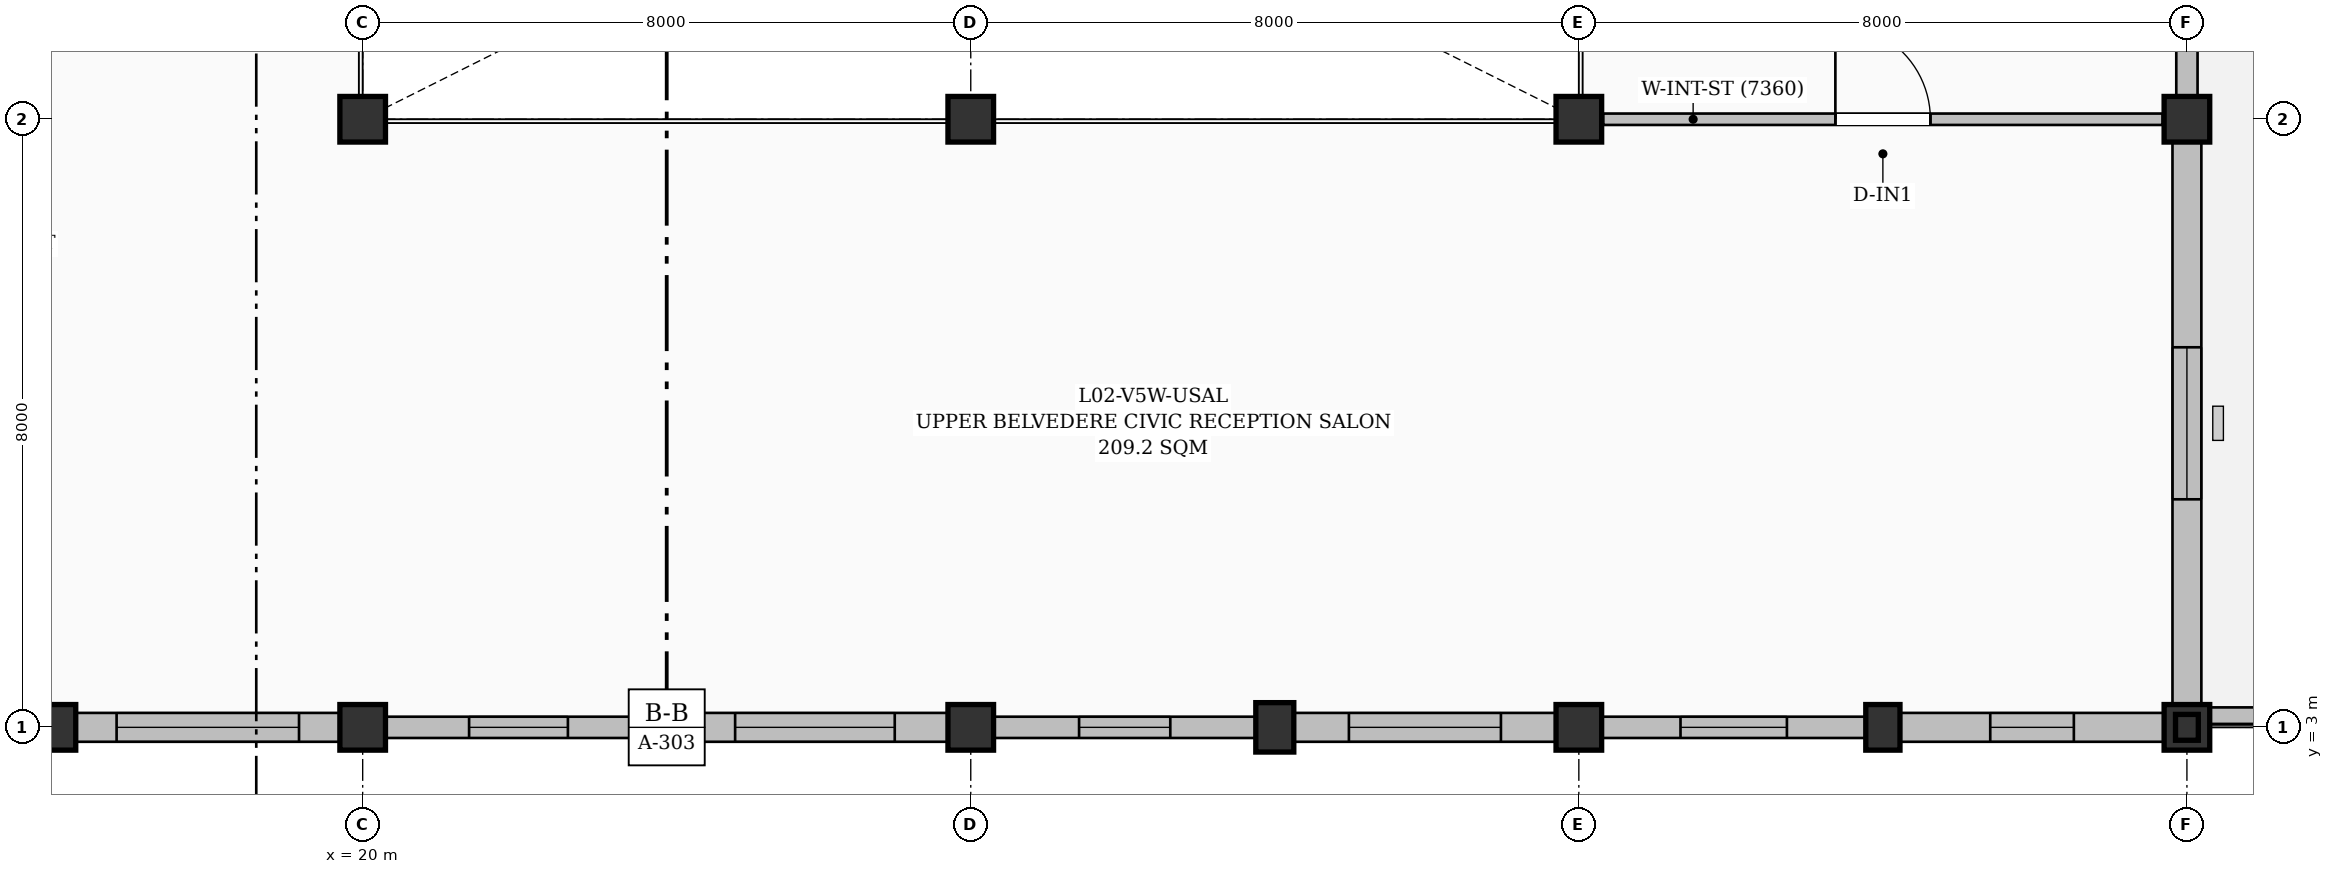
"""IFC4 building model, lengths in metres.
Left out: names, types, materials, properties, quantities, classifications, styles, units other than length and angle.
Written with IfcOpenShell. Run it as: python <this file> out.ifc"""

import sys

from ifc_helpers import new_model, si_unit, direction, frame, frame_2d, origin, origin_2d, place, context, subcontext, project, spatial, rectangle, i_section, extrude, element, fill, save


model = new_model("IFC4")
c1 = context("Model", 3, precision=1e-05, world=origin(), true_north=direction((0.0, 1.0)))
c2 = subcontext(c1, "Body", "Model", "MODEL_VIEW")
j1 = project(units=[si_unit("LENGTHUNIT", "METRE"), si_unit("PLANEANGLEUNIT", "RADIAN")], contexts=[c1])
p1 = place(None, origin())
s1 = spatial("IfcSite", under=j1, at=p1, CompositionType="ELEMENT")
p2 = place(p1, origin())
s2 = spatial("IfcBuilding", under=s1, at=p2, CompositionType="ELEMENT")
p3 = place(p2, frame((0.0, 0.0, 9.3)))
s3 = spatial("IfcBuildingStorey", under=s2, at=p3, CompositionType="ELEMENT", Elevation=9.3)
p4 = place(p3, frame((16.0, 3.0, 0.0), z_axis=(0.0, 0.0, 1.0), x_axis=(1.0, 0.0, 0.0)))
e1 = element("IfcColumn", 1, at=p4, inside=s3, PredefinedType="PILASTER", context=c2, shape_type="SweptSolid", body=[
    extrude(rectangle(XDim=0.45, YDim=0.6, at=origin_2d()), origin(), (0.0, 0.0, 1.0), 4.5),
])
for number, where, z_axis, x_axis in (
    (2, (20.0, 3.0, 0.0), (0.0, 0.0, 1.0), (1.0, 0.0, 0.0)),
    (3, (20.0, 11.0, 0.0), (0.0, 0.0, 1.0), (1.0, 0.0, 0.0)),
):
    element("IfcColumn", number, at=place(p3, frame(where, z_axis=z_axis, x_axis=x_axis)), inside=s3, PredefinedType="COLUMN", context=c2, shape_type="SweptSolid", body=[
        extrude(rectangle(XDim=0.6, YDim=0.6, at=origin_2d()), origin(), (0.0, 0.0, 1.0), 4.5),
    ])
p5 = place(p3, frame((24.0, 3.0, 0.0), z_axis=(0.0, 0.0, 1.0), x_axis=(1.0, 0.0, 0.0)))
e4 = element("IfcColumn", 4, at=p5, inside=s3, PredefinedType="PILASTER", context=c2, shape_type="SweptSolid", body=[
    extrude(rectangle(XDim=0.4, YDim=0.55, at=origin_2d()), origin(), (0.0, 0.0, 1.0), 4.5),
])
for number, where, z_axis, x_axis in (
    (5, (28.0, 3.0, 0.0), (0.0, 0.0, 1.0), (1.0, 0.0, 0.0)),
    (6, (28.0, 11.0, 0.0), (0.0, 0.0, 1.0), (1.0, 0.0, 0.0)),
):
    element("IfcColumn", number, at=place(p3, frame(where, z_axis=z_axis, x_axis=x_axis)), inside=s3, PredefinedType="COLUMN", context=c2, shape_type="SweptSolid", body=[
        extrude(rectangle(XDim=0.6, YDim=0.6, at=origin_2d()), origin(), (0.0, 0.0, 1.0), 4.5),
    ])
p6 = place(p3, frame((32.0, 3.0, 0.0), z_axis=(0.0, 0.0, 1.0), x_axis=(1.0, 0.0, 0.0)))
e7 = element("IfcColumn", 7, at=p6, inside=s3, PredefinedType="PILASTER", context=c2, shape_type="SweptSolid", body=[
    extrude(rectangle(XDim=0.5, YDim=0.65, at=origin_2d()), origin(), (0.0, 0.0, 1.0), 4.5),
])
for number, where, z_axis, x_axis in (
    (8, (36.0, 3.0, 0.0), (0.0, 0.0, 1.0), (1.0, 0.0, 0.0)),
    (9, (36.0, 11.0, 0.0), (0.0, 0.0, 1.0), (1.0, 0.0, 0.0)),
):
    element("IfcColumn", number, at=place(p3, frame(where, z_axis=z_axis, x_axis=x_axis)), inside=s3, PredefinedType="COLUMN", context=c2, shape_type="SweptSolid", body=[
        extrude(rectangle(XDim=0.6, YDim=0.6, at=origin_2d()), origin(), (0.0, 0.0, 1.0), 4.5),
    ])
p7 = place(p3, frame((40.0, 3.0, 0.0), z_axis=(0.0, 0.0, 1.0), x_axis=(1.0, 0.0, 0.0)))
e10 = element("IfcColumn", 10, at=p7, inside=s3, PredefinedType="PILASTER", context=c2, shape_type="SweptSolid", body=[
    extrude(rectangle(XDim=0.45, YDim=0.6, at=origin_2d()), origin(), (0.0, 0.0, 1.0), 4.5),
])
for number, where, z_axis, x_axis in (
    (11, (44.0, 3.0, 0.0), (0.0, 0.0, 1.0), (1.0, 0.0, 0.0)),
    (12, (44.0, 11.0, 0.0), (0.0, 0.0, 1.0), (1.0, 0.0, 0.0)),
):
    element("IfcColumn", number, at=place(p3, frame(where, z_axis=z_axis, x_axis=x_axis)), inside=s3, PredefinedType="COLUMN", context=c2, shape_type="SweptSolid", body=[
        extrude(rectangle(XDim=0.6, YDim=0.6, at=origin_2d()), origin(), (0.0, 0.0, 1.0), 4.5),
    ])
p8 = place(p3, frame((44.0, 3.0, 4.5), z_axis=(0.0, 0.0, 1.0), x_axis=(1.0, 0.0, 0.0)))
e13 = element("IfcColumn", 13, at=p8, inside=s3, PredefinedType="COLUMN", context=c2, shape_type="SweptSolid", body=[
    extrude(i_section(OverallWidth=0.3, OverallDepth=0.34, WebThickness=0.012, FlangeThickness=0.021, FilletRadius=0.027, at=origin_2d()), origin(), (0.0, 0.0, 1.0), 1.566),
])
p9 = place(p3, frame((44.0, 18.7, 0.0), z_axis=(0.0, 0.0, 1.0), x_axis=(0.0, -1.0, 0.0)))
e14 = element("IfcWall", 14, at=p9, inside=s3, PredefinedType="SOLIDWALL", context=c2, shape_type="SweptSolid", body=[
    extrude(rectangle(XDim=7.4, YDim=0.28, at=frame_2d((3.7, 0.0))), origin(), (0.0, 0.0, 1.0), 3.585),
])
p10 = place(p9, frame((3.0, 0.0, 0.95)))
e15 = element("IfcOpeningElement", 15, at=p10, cuts=e14, PredefinedType="OPENING", context=c2, shape_type="SweptSolid", body=[
    extrude(rectangle(XDim=1.4, YDim=1.8, at=frame_2d((0.7, 0.9))), frame((0.0, 0.15, 0.0), z_axis=(0.0, -1.0, 0.0), x_axis=(1.0, 0.0, 0.0)), (0.0, 0.0, 1.0), 0.3),
])
p11 = place(p3, frame((44.0, 10.7, 0.0), z_axis=(0.0, 0.0, 1.0), x_axis=(0.0, -1.0, 0.0)))
e16 = element("IfcWall", 16, at=p11, inside=s3, PredefinedType="SOLIDWALL", context=c2, shape_type="SweptSolid", body=[
    extrude(rectangle(XDim=7.4, YDim=0.38, at=frame_2d((3.7, 0.0))), origin(), (0.0, 0.0, 1.0), 3.585),
])
p12 = place(p11, frame((2.7, 0.0, 0.95)))
e17 = element("IfcOpeningElement", 17, at=p12, cuts=e16, PredefinedType="OPENING", context=c2, shape_type="SweptSolid", body=[
    extrude(rectangle(XDim=2.0, YDim=1.8, at=frame_2d((1.0, 0.9))), frame((0.0, 0.2, 0.0), z_axis=(0.0, -1.0, 0.0), x_axis=(1.0, 0.0, 0.0)), (0.0, 0.0, 1.0), 0.4),
])
p13 = place(p3, frame((43.7, 3.0, 0.0), z_axis=(0.0, 0.0, 1.0), x_axis=(-1.0, 0.0, 0.0)))
e18 = element("IfcWall", 18, at=p13, inside=s3, PredefinedType="SOLIDWALL", context=c2, shape_type="SweptSolid", body=[
    extrude(rectangle(XDim=3.475, YDim=0.38, at=frame_2d((1.737, 0.0))), origin(), (0.0, 0.0, 1.0), 4.125),
])
p14 = place(p13, frame((1.188, 0.0, 0.95)))
e19 = element("IfcOpeningElement", 19, at=p14, cuts=e18, PredefinedType="OPENING", context=c2, shape_type="SweptSolid", body=[
    extrude(rectangle(XDim=1.1, YDim=2.0, at=frame_2d((0.55, 1.0))), frame((0.0, 0.2, 0.0), z_axis=(0.0, -1.0, 0.0), x_axis=(1.0, 0.0, 0.0)), (0.0, 0.0, 1.0), 0.4),
])
p15 = place(p3, frame((39.775, 3.0, 0.0), z_axis=(0.0, 0.0, 1.0), x_axis=(-1.0, 0.0, 0.0)))
e20 = element("IfcWall", 20, at=p15, inside=s3, PredefinedType="SOLIDWALL", context=c2, shape_type="SweptSolid", body=[
    extrude(rectangle(XDim=3.475, YDim=0.28, at=frame_2d((1.737, 0.0))), origin(), (0.0, 0.0, 1.0), 4.125),
])
p16 = place(p15, frame((1.038, 0.0, 0.95)))
e21 = element("IfcOpeningElement", 21, at=p16, cuts=e20, PredefinedType="OPENING", context=c2, shape_type="SweptSolid", body=[
    extrude(rectangle(XDim=1.4, YDim=1.8, at=frame_2d((0.7, 0.9))), frame((0.0, 0.15, 0.0), z_axis=(0.0, -1.0, 0.0), x_axis=(1.0, 0.0, 0.0)), (0.0, 0.0, 1.0), 0.3),
])
p17 = place(p3, frame((35.7, 3.0, 0.0), z_axis=(0.0, 0.0, 1.0), x_axis=(-1.0, 0.0, 0.0)))
e22 = element("IfcWall", 22, at=p17, inside=s3, PredefinedType="SOLIDWALL", context=c2, shape_type="SweptSolid", body=[
    extrude(rectangle(XDim=3.45, YDim=0.38, at=frame_2d((1.725, 0.0))), origin(), (0.0, 0.0, 1.0), 4.125),
])
p18 = place(p17, frame((0.725, 0.0, 0.95)))
e23 = element("IfcOpeningElement", 23, at=p18, cuts=e22, PredefinedType="OPENING", context=c2, shape_type="SweptSolid", body=[
    extrude(rectangle(XDim=2.0, YDim=1.8, at=frame_2d((1.0, 0.9))), frame((0.0, 0.2, 0.0), z_axis=(0.0, -1.0, 0.0), x_axis=(1.0, 0.0, 0.0)), (0.0, 0.0, 1.0), 0.4),
])
p19 = place(p3, frame((31.75, 3.0, 0.0), z_axis=(0.0, 0.0, 1.0), x_axis=(-1.0, 0.0, 0.0)))
e24 = element("IfcWall", 24, at=p19, inside=s3, PredefinedType="SOLIDWALL", context=c2, shape_type="SweptSolid", body=[
    extrude(rectangle(XDim=3.45, YDim=0.28, at=frame_2d((1.725, 0.0))), origin(), (0.0, 0.0, 1.0), 4.125),
])
p20 = place(p19, frame((1.125, 0.0, 0.95)))
e25 = element("IfcOpeningElement", 25, at=p20, cuts=e24, PredefinedType="OPENING", context=c2, shape_type="SweptSolid", body=[
    extrude(rectangle(XDim=1.2, YDim=1.5, at=frame_2d((0.6, 0.75))), frame((0.0, 0.15, 0.0), z_axis=(0.0, -1.0, 0.0), x_axis=(1.0, 0.0, 0.0)), (0.0, 0.0, 1.0), 0.3),
])
p21 = place(p3, frame((27.7, 3.0, 0.0), z_axis=(0.0, 0.0, 1.0), x_axis=(-1.0, 0.0, 0.0)))
e26 = element("IfcWall", 26, at=p21, inside=s3, PredefinedType="SOLIDWALL", context=c2, shape_type="SweptSolid", body=[
    extrude(rectangle(XDim=3.5, YDim=0.38, at=frame_2d((1.75, 0.0))), origin(), (0.0, 0.0, 1.0), 4.125),
])
p22 = place(p21, frame((0.7, 0.0, 0.95)))
e27 = element("IfcOpeningElement", 27, at=p22, cuts=e26, PredefinedType="OPENING", context=c2, shape_type="SweptSolid", body=[
    extrude(rectangle(XDim=2.1, YDim=1.5, at=frame_2d((1.05, 0.75))), frame((0.0, 0.2, 0.0), z_axis=(0.0, -1.0, 0.0), x_axis=(1.0, 0.0, 0.0)), (0.0, 0.0, 1.0), 0.4),
])
p23 = place(p3, frame((23.8, 3.0, 0.0), z_axis=(0.0, 0.0, 1.0), x_axis=(-1.0, 0.0, 0.0)))
e28 = element("IfcWall", 28, at=p23, inside=s3, PredefinedType="SOLIDWALL", context=c2, shape_type="SweptSolid", body=[
    extrude(rectangle(XDim=3.5, YDim=0.28, at=frame_2d((1.75, 0.0))), origin(), (0.0, 0.0, 1.0), 4.125),
])
p24 = place(p23, frame((1.1, 0.0, 0.95)))
e29 = element("IfcOpeningElement", 29, at=p24, cuts=e28, PredefinedType="OPENING", context=c2, shape_type="SweptSolid", body=[
    extrude(rectangle(XDim=1.3, YDim=1.4, at=frame_2d((0.65, 0.7))), frame((0.0, 0.15, 0.0), z_axis=(0.0, -1.0, 0.0), x_axis=(1.0, 0.0, 0.0)), (0.0, 0.0, 1.0), 0.3),
])
p25 = place(p3, frame((19.7, 3.0, 0.0), z_axis=(0.0, 0.0, 1.0), x_axis=(-1.0, 0.0, 0.0)))
e30 = element("IfcWall", 30, at=p25, inside=s3, PredefinedType="SOLIDWALL", context=c2, shape_type="SweptSolid", body=[
    extrude(rectangle(XDim=3.475, YDim=0.38, at=frame_2d((1.737, 0.0))), origin(), (0.0, 0.0, 1.0), 4.125),
])
p26 = place(p25, frame((0.538, 0.0, 0.95)))
e31 = element("IfcOpeningElement", 31, at=p26, cuts=e30, PredefinedType="OPENING", context=c2, shape_type="SweptSolid", body=[
    extrude(rectangle(XDim=2.4, YDim=1.2, at=frame_2d((1.2, 0.6))), frame((0.0, 0.2, 0.0), z_axis=(0.0, -1.0, 0.0), x_axis=(1.0, 0.0, 0.0)), (0.0, 0.0, 1.0), 0.4),
])
p27 = place(p3, frame((44.0, 3.15, 0.0), z_axis=(0.0, 0.0, 1.0), x_axis=(1.0, 0.0, 0.0)))
e32 = element("IfcWall", 32, at=p27, inside=s3, PredefinedType="PARAPET", context=c2, shape_type="SweptSolid", body=[
    extrude(rectangle(XDim=15.85, YDim=0.225, at=frame_2d((7.925, 0.0))), origin(), (0.0, 0.0, 1.0), 0.45),
])
p28 = place(p3, frame((36.32, 11.0, 0.0), z_axis=(0.0, 0.0, 1.0), x_axis=(1.0, 0.0, 0.0)))
e33 = element("IfcWall", 33, at=p28, inside=s3, PredefinedType="PARTITIONING", context=c2, shape_type="SweptSolid", body=[
    extrude(rectangle(XDim=7.36, YDim=0.15, at=frame_2d((3.68, 0.0))), origin(), (0.0, 0.0, 1.0), 4.25),
])
p29 = place(p28, frame((3.055, 0.0, 0.0)))
e34 = element("IfcOpeningElement", 34, at=p29, cuts=e33, PredefinedType="OPENING", context=c2, shape_type="SweptSolid", body=[
    extrude(rectangle(XDim=1.25, YDim=2.15, at=frame_2d((0.625, 1.075))), frame((0.0, 0.085, 0.0), z_axis=(0.0, -1.0, 0.0), x_axis=(1.0, 0.0, 0.0)), (0.0, 0.0, 1.0), 0.17),
])
p30 = place(p12, origin())
e35 = element("IfcWindow", 35, at=p30, inside=s3, PartitioningType="TRIPLE_PANEL_VERTICAL", PredefinedType="WINDOW", context=c2, shape_type="SweptSolid", body=[
    extrude(rectangle(XDim=2.0, YDim=1.8, at=frame_2d((1.0, 0.9))), frame((0.0, 0.03, 0.0), z_axis=(0.0, -1.0, 0.0), x_axis=(1.0, 0.0, 0.0)), (0.0, 0.0, 1.0), 0.06),
])
fill(e17, e35)
p31 = place(p14, origin())
e36 = element("IfcWindow", 36, at=p31, inside=s3, PartitioningType="SINGLE_PANEL", PredefinedType="WINDOW", context=c2, shape_type="SweptSolid", body=[
    extrude(rectangle(XDim=1.1, YDim=2.0, at=frame_2d((0.55, 1.0))), frame((0.0, 0.03, 0.0), z_axis=(0.0, -1.0, 0.0), x_axis=(1.0, 0.0, 0.0)), (0.0, 0.0, 1.0), 0.06),
])
fill(e19, e36)
p32 = place(p16, origin())
e37 = element("IfcWindow", 37, at=p32, inside=s3, PartitioningType="DOUBLE_PANEL_VERTICAL", PredefinedType="WINDOW", context=c2, shape_type="SweptSolid", body=[
    extrude(rectangle(XDim=1.4, YDim=1.8, at=frame_2d((0.7, 0.9))), frame((0.0, 0.03, 0.0), z_axis=(0.0, -1.0, 0.0), x_axis=(1.0, 0.0, 0.0)), (0.0, 0.0, 1.0), 0.06),
])
fill(e21, e37)
p33 = place(p18, origin())
e38 = element("IfcWindow", 38, at=p33, inside=s3, PartitioningType="TRIPLE_PANEL_VERTICAL", PredefinedType="WINDOW", context=c2, shape_type="SweptSolid", body=[
    extrude(rectangle(XDim=2.0, YDim=1.8, at=frame_2d((1.0, 0.9))), frame((0.0, 0.03, 0.0), z_axis=(0.0, -1.0, 0.0), x_axis=(1.0, 0.0, 0.0)), (0.0, 0.0, 1.0), 0.06),
])
fill(e23, e38)
p34 = place(p20, origin())
e39 = element("IfcWindow", 39, at=p34, inside=s3, PartitioningType="SINGLE_PANEL", PredefinedType="WINDOW", context=c2, shape_type="SweptSolid", body=[
    extrude(rectangle(XDim=1.2, YDim=1.5, at=frame_2d((0.6, 0.75))), frame((0.0, 0.03, 0.0), z_axis=(0.0, -1.0, 0.0), x_axis=(1.0, 0.0, 0.0)), (0.0, 0.0, 1.0), 0.06),
])
fill(e25, e39)
p35 = place(p22, origin())
e40 = element("IfcWindow", 40, at=p35, inside=s3, PartitioningType="TRIPLE_PANEL_VERTICAL", PredefinedType="WINDOW", context=c2, shape_type="SweptSolid", body=[
    extrude(rectangle(XDim=2.1, YDim=1.5, at=frame_2d((1.05, 0.75))), frame((0.0, 0.03, 0.0), z_axis=(0.0, -1.0, 0.0), x_axis=(1.0, 0.0, 0.0)), (0.0, 0.0, 1.0), 0.06),
])
fill(e27, e40)
p36 = place(p24, origin())
e41 = element("IfcWindow", 41, at=p36, inside=s3, PartitioningType="SINGLE_PANEL", PredefinedType="WINDOW", context=c2, shape_type="SweptSolid", body=[
    extrude(rectangle(XDim=1.3, YDim=1.4, at=frame_2d((0.65, 0.7))), frame((0.0, 0.03, 0.0), z_axis=(0.0, -1.0, 0.0), x_axis=(1.0, 0.0, 0.0)), (0.0, 0.0, 1.0), 0.06),
])
fill(e29, e41)
p37 = place(p26, origin())
e42 = element("IfcWindow", 42, at=p37, inside=s3, PartitioningType="TRIPLE_PANEL_HORIZONTAL", PredefinedType="WINDOW", context=c2, shape_type="SweptSolid", body=[
    extrude(rectangle(XDim=2.4, YDim=1.2, at=frame_2d((1.2, 0.6))), frame((0.0, 0.03, 0.0), z_axis=(0.0, -1.0, 0.0), x_axis=(1.0, 0.0, 0.0)), (0.0, 0.0, 1.0), 0.06),
])
fill(e31, e42)
p38 = place(p29, origin())
e43 = element("IfcDoor", 43, at=p38, inside=s3, OperationType="SINGLE_SWING_LEFT", PredefinedType="DOOR", context=c2, shape_type="SweptSolid", body=[
    extrude(rectangle(XDim=1.25, YDim=2.15, at=frame_2d((0.625, 1.075))), frame((0.0, 0.025, 0.0), z_axis=(0.0, -1.0, 0.0), x_axis=(1.0, 0.0, 0.0)), (0.0, 0.0, 1.0), 0.05),
])
fill(e34, e43)
save(model, sys.argv[1])
